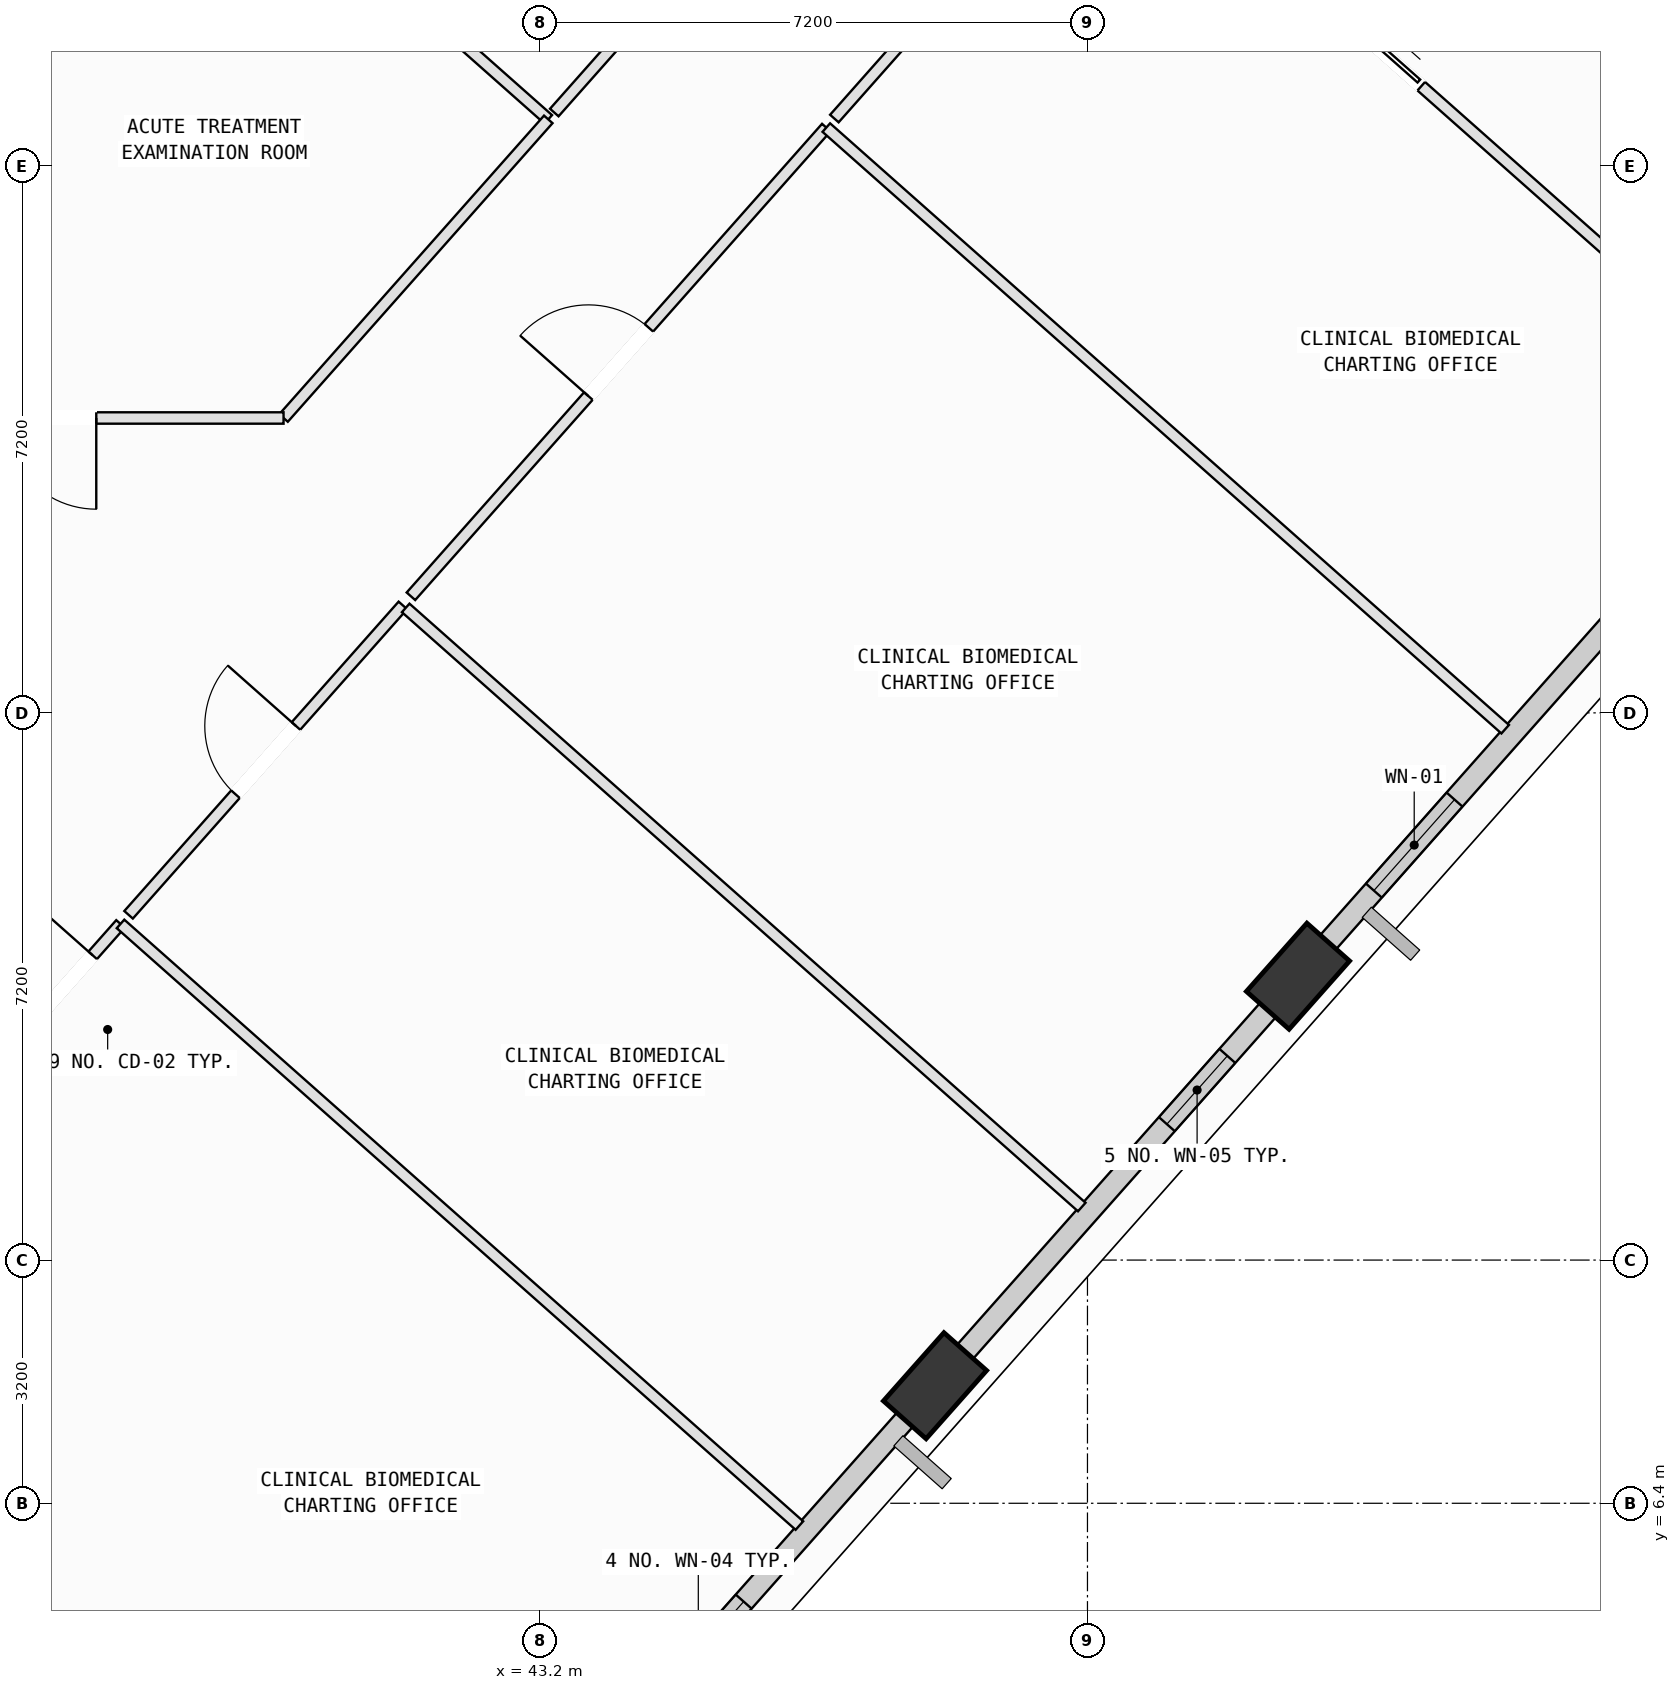
"""IFC4 building model, lengths in metres.
Left out: names, types, materials, properties, quantities, classifications, styles, units other than length and angle.
Written with IfcOpenShell. Run it as: python <this file> out.ifc"""

import sys

from ifc_helpers import new_model, si_unit, direction, frame, frame_2d, origin, origin_2d, place, context, subcontext, project, spatial, rectangle, extrude, element, fill, save


model = new_model("IFC4")
c1 = context("Model", 3, precision=1e-05, world=origin(), true_north=direction((0.0, 1.0)))
c2 = subcontext(c1, "Body", "Model", "MODEL_VIEW")
j1 = project(units=[si_unit("LENGTHUNIT", "METRE"), si_unit("PLANEANGLEUNIT", "RADIAN")], contexts=[c1])
p1 = place(None, origin())
s1 = spatial("IfcSite", under=j1, at=p1, CompositionType="ELEMENT")
p2 = place(p1, origin())
s2 = spatial("IfcBuilding", under=s1, at=p2, CompositionType="ELEMENT")
p3 = place(p2, frame((0.0, 0.0, 231.2)))
s3 = spatial("IfcBuildingStorey", under=s2, at=p3, CompositionType="ELEMENT", Elevation=231.2)
p4 = place(p3, frame((48.394, 7.947, 0.002), z_axis=(0.069040851075, 0.061619719946, 0.995708979068), x_axis=(-0.997598109289, -0.001339471192, 0.069254733848)))
e1 = element("IfcColumn", 1, at=p4, inside=s3, PredefinedType="COLUMN", context=c2, shape_type="SweptSolid", body=[
    extrude(rectangle(XDim=1.2, YDim=0.75, at=origin_2d()), origin(), (0.0, 0.0, 1.0), 4.014),
])
p5 = place(p3, frame((53.17, 13.335, 0.002), z_axis=(0.046651186757, 0.081137787658, 0.995610529368), x_axis=(-0.946393946399, -0.315329163817, 0.070042963004)))
e2 = element("IfcColumn", 2, at=p5, inside=s3, PredefinedType="COLUMN", context=c2, shape_type="SweptSolid", body=[
    extrude(rectangle(XDim=1.2, YDim=0.75, at=origin_2d()), origin(), (0.0, 0.0, 1.0), 4.014),
])
p6 = place(p3, frame((48.253, 7.788, 0.0), z_axis=(0.0, 0.0, 1.0), x_axis=(-0.663285710917, -0.748366264401, 0.0)))
e3 = element("IfcWall", 3, at=p6, inside=s3, PredefinedType="SOLIDWALL", context=c2, shape_type="SweptSolid", body=[
    extrude(rectangle(XDim=6.413, YDim=0.28, at=frame_2d((3.207, 0.0))), origin(), (0.0, 0.0, 1.0), 3.265),
])
p7 = place(p6, frame((3.583, 0.0, 0.75)))
e4 = element("IfcOpeningElement", 4, at=p7, cuts=e3, PredefinedType="OPENING", context=c2, shape_type="SweptSolid", body=[
    extrude(rectangle(XDim=1.8, YDim=2.05, at=frame_2d((0.9, 1.025))), frame((0.0, 0.15, 0.0), z_axis=(0.0, -1.0, 0.0), x_axis=(1.0, 0.0, 0.0)), (0.0, 0.0, 1.0), 0.3),
])
p8 = place(p3, frame((53.03, 13.177, 0.0), z_axis=(0.0, 0.0, 1.0), x_axis=(-0.663279868265, -0.74837144277, 0.0)))
e5 = element("IfcWall", 5, at=p8, inside=s3, PredefinedType="SOLIDWALL", context=c2, shape_type="SweptSolid", body=[
    extrude(rectangle(XDim=6.407, YDim=0.28, at=frame_2d((3.203, 0.0))), origin(), (0.0, 0.0, 1.0), 3.265),
])
p9 = place(p8, frame((1.19, 0.0, 0.75)))
e6 = element("IfcOpeningElement", 6, at=p9, cuts=e5, PredefinedType="OPENING", context=c2, shape_type="SweptSolid", body=[
    extrude(rectangle(XDim=1.2, YDim=1.75, at=frame_2d((0.6, 0.875))), frame((0.0, 0.15, 0.0), z_axis=(0.0, -1.0, 0.0), x_axis=(1.0, 0.0, 0.0)), (0.0, 0.0, 1.0), 0.3),
])
p10 = place(p3, frame((57.812, 18.573, 0.0), z_axis=(0.0, 0.0, 1.0), x_axis=(-0.663260552, -0.748388562287, 0.0)))
e7 = element("IfcWall", 7, at=p10, inside=s3, PredefinedType="SOLIDWALL", context=c2, shape_type="SweptSolid", body=[
    extrude(rectangle(XDim=6.418, YDim=0.28, at=frame_2d((3.209, 0.0))), origin(), (0.0, 0.0, 1.0), 3.265),
])
p11 = place(p10, frame((3.893, 0.0, 0.75)))
e8 = element("IfcOpeningElement", 8, at=p11, cuts=e7, PredefinedType="OPENING", context=c2, shape_type="SweptSolid", body=[
    extrude(rectangle(XDim=1.6, YDim=1.95, at=frame_2d((0.8, 0.975))), frame((0.0, 0.15, 0.0), z_axis=(0.0, -1.0, 0.0), x_axis=(1.0, 0.0, 0.0)), (0.0, 0.0, 1.0), 0.3),
])
p12 = place(p3, frame((53.099, 29.767, 0.0), z_axis=(0.0, 0.0, 1.0), x_axis=(0.748389152316, -0.66325988624, 0.0)))
e9 = element("IfcWall", 9, at=p12, inside=s3, PredefinedType="SOLIDWALL", context=c2, shape_type="SweptSolid", body=[
    extrude(rectangle(XDim=7.046, YDim=0.28, at=frame_2d((3.523, 0.0))), origin(), (0.0, 0.0, 1.0), 3.265),
])
p13 = place(p3, frame((35.147, 24.51, 0.0), z_axis=(0.0, 0.0, 1.0), x_axis=(0.663277940137, 0.748373151661, 0.0)))
e10 = element("IfcWall", 10, at=p13, inside=s3, PredefinedType="SOLIDWALL", context=c2, shape_type="SweptSolid", body=[
    extrude(rectangle(XDim=6.409, YDim=0.28, at=frame_2d((3.205, 0.0))), origin(), (0.0, 0.0, 1.0), 3.265),
])
p14 = place(p13, frame((1.838, 0.0, 0.75)))
e11 = element("IfcOpeningElement", 11, at=p14, cuts=e10, PredefinedType="OPENING", context=c2, shape_type="SweptSolid", body=[
    extrude(rectangle(XDim=1.6, YDim=1.95, at=frame_2d((0.8, 0.975))), frame((0.0, 0.15, 0.0), z_axis=(0.0, -1.0, 0.0), x_axis=(1.0, 0.0, 0.0)), (0.0, 0.0, 1.0), 0.3),
])
p15 = place(p3, frame((32.177, 7.675, 0.0), z_axis=(0.0, 0.0, 1.0), x_axis=(0.748389037184, -0.66326001615, 0.0)))
e12 = element("IfcWall", 12, at=p15, inside=s3, PredefinedType="PARTITIONING", context=c2, shape_type="SweptSolid", body=[
    extrude(rectangle(XDim=11.842, YDim=0.15, at=frame_2d((5.921, 0.0))), origin(), (0.0, 0.0, 1.0), 3.78),
])
p16 = place(p15, frame((5.731, 0.0, 0.0)))
e13 = element("IfcOpeningElement", 13, at=p16, cuts=e12, PredefinedType="OPENING", context=c2, shape_type="SweptSolid", body=[
    extrude(rectangle(XDim=0.86, YDim=2.06, at=frame_2d((0.43, 1.03))), frame((0.0, 0.085, 0.0), z_axis=(0.0, -1.0, 0.0), x_axis=(1.0, 0.0, 0.0)), (0.0, 0.0, 1.0), 0.17),
])
p17 = place(p3, frame((36.15, 12.299, 0.0), z_axis=(0.0, 0.0, 1.0), x_axis=(0.663330445226, 0.748326613476, 0.0)))
e14 = element("IfcWall", 14, at=p17, inside=s3, PredefinedType="PARTITIONING", context=c2, shape_type="SweptSolid", body=[
    extrude(rectangle(XDim=2.304, YDim=0.15, at=frame_2d((1.152, 0.0))), origin(), (0.0, 0.0, 1.0), 3.78),
])
p18 = place(p17, frame((0.552, 0.0, 0.0)))
e15 = element("IfcOpeningElement", 15, at=p18, cuts=e14, PredefinedType="OPENING", context=c2, shape_type="SweptSolid", body=[
    extrude(rectangle(XDim=1.2, YDim=2.15, at=frame_2d((0.6, 1.075))), frame((0.0, 0.085, 0.0), z_axis=(0.0, -1.0, 0.0), x_axis=(1.0, 0.0, 0.0)), (0.0, 0.0, 1.0), 0.17),
])
p19 = place(p3, frame((37.678, 14.023, 0.0), z_axis=(0.0, 0.0, 1.0), x_axis=(0.74839262996, -0.663255962221, 0.0)))
e16 = element("IfcWall", 16, at=p19, inside=s3, PredefinedType="PARTITIONING", context=c2, shape_type="SweptSolid", body=[
    extrude(rectangle(XDim=11.935, YDim=0.15, at=frame_2d((5.968, 0.0))), origin(), (0.0, 0.0, 1.0), 3.78),
])
p20 = place(p3, frame((37.784, 14.143, 0.0), z_axis=(0.0, 0.0, 1.0), x_axis=(0.663380047742, 0.74828264196, 0.0)))
e17 = element("IfcWall", 17, at=p20, inside=s3, PredefinedType="PARTITIONING", context=c2, shape_type="SweptSolid", body=[
    extrude(rectangle(XDim=5.44, YDim=0.15, at=frame_2d((2.72, 0.0))), origin(), (0.0, 0.0, 1.0), 3.78),
])
p21 = place(p20, frame((2.12, 0.0, 0.0)))
e18 = element("IfcOpeningElement", 18, at=p21, cuts=e17, PredefinedType="OPENING", context=c2, shape_type="SweptSolid", body=[
    extrude(rectangle(XDim=1.2, YDim=2.15, at=frame_2d((0.6, 1.075))), frame((0.0, 0.085, 0.0), z_axis=(0.0, -1.0, 0.0), x_axis=(1.0, 0.0, 0.0)), (0.0, 0.0, 1.0), 0.17),
])
p22 = place(p3, frame((41.43, 18.181, 0.0), z_axis=(0.0, 0.0, 1.0), x_axis=(0.748405797498, -0.663241104178, 0.0)))
e19 = element("IfcWall", 19, at=p22, inside=s3, PredefinedType="PARTITIONING", context=c2, shape_type="SweptSolid", body=[
    extrude(rectangle(XDim=11.885, YDim=0.15, at=frame_2d((5.943, 0.0))), origin(), (0.0, 0.0, 1.0), 3.78),
])
p23 = place(p3, frame((48.952, 8.229, 0.0), z_axis=(0.0, 0.0, 1.0), x_axis=(-0.663561863998, -0.748121415712, 0.0)))
e20 = element("IfcWall", 20, at=p23, inside=s3, PredefinedType="PARTITIONING", context=c2, shape_type="SweptSolid", body=[
    extrude(rectangle(XDim=0.794, YDim=0.15, at=frame_2d((0.397, 0.0))), origin(), (0.0, 0.0, 1.0), 3.265),
])
p24 = place(p3, frame((41.499, 18.334, 0.0), z_axis=(0.0, 0.0, 1.0), x_axis=(0.663232090045, 0.748413785773, 0.0)))
e21 = element("IfcWall", 21, at=p24, inside=s3, PredefinedType="PARTITIONING", context=c2, shape_type="SweptSolid", body=[
    extrude(rectangle(XDim=8.24, YDim=0.15, at=frame_2d((4.12, 0.0))), origin(), (0.0, 0.0, 1.0), 3.78),
])
p25 = place(p24, frame((3.52, 0.0, 0.0)))
e22 = element("IfcOpeningElement", 22, at=p25, cuts=e21, PredefinedType="OPENING", context=c2, shape_type="SweptSolid", body=[
    extrude(rectangle(XDim=1.2, YDim=2.15, at=frame_2d((0.6, 1.075))), frame((0.0, 0.085, 0.0), z_axis=(0.0, -1.0, 0.0), x_axis=(1.0, 0.0, 0.0)), (0.0, 0.0, 1.0), 0.17),
])
p26 = place(p3, frame((46.964, 24.501, 0.0), z_axis=(0.0, 0.0, 1.0), x_axis=(0.748383631113, -0.663266116037, 0.0)))
e23 = element("IfcWall", 23, at=p26, inside=s3, PredefinedType="PARTITIONING", context=c2, shape_type="SweptSolid", body=[
    extrude(rectangle(XDim=11.935, YDim=0.15, at=frame_2d((5.967, 0.0))), origin(), (0.0, 0.0, 1.0), 3.78),
])
p27 = place(p3, frame((53.726, 13.617, 0.0), z_axis=(0.0, 0.0, 1.0), x_axis=(-0.662274323809, -0.749261449712, 0.0)))
e24 = element("IfcWall", 24, at=p27, inside=s3, PredefinedType="PARTITIONING", context=c2, shape_type="SweptSolid", body=[
    extrude(rectangle(XDim=0.792, YDim=0.15, at=frame_2d((0.396, 0.0))), origin(), (0.0, 0.0, 1.0), 3.265),
])
p28 = place(p3, frame((47.07, 24.62, 0.0), z_axis=(0.0, 0.0, 1.0), x_axis=(0.663187557716, 0.748453247231, 0.0)))
e25 = element("IfcWall", 25, at=p28, inside=s3, PredefinedType="PARTITIONING", context=c2, shape_type="SweptSolid", body=[
    extrude(rectangle(XDim=5.44, YDim=0.15, at=frame_2d((2.72, 0.0))), origin(), (0.0, 0.0, 1.0), 3.78),
])
p29 = place(p28, frame((2.12, 0.0, 0.0)))
e26 = element("IfcOpeningElement", 26, at=p29, cuts=e25, PredefinedType="OPENING", context=c2, shape_type="SweptSolid", body=[
    extrude(rectangle(XDim=1.2, YDim=2.15, at=frame_2d((0.6, 1.075))), frame((0.0, 0.085, 0.0), z_axis=(0.0, -1.0, 0.0), x_axis=(1.0, 0.0, 0.0)), (0.0, 0.0, 1.0), 0.17),
])
p30 = place(p3, frame((50.678, 28.692, 0.0), z_axis=(0.0, 0.0, 1.0), x_axis=(0.748311065443, -0.663347985099, 0.0)))
e27 = element("IfcWall", 27, at=p30, inside=s3, PredefinedType="PARTITIONING", context=c2, shape_type="SweptSolid", body=[
    extrude(rectangle(XDim=10.135, YDim=0.15, at=frame_2d((5.067, 0.0))), origin(), (0.0, 0.0, 1.0), 3.78),
])
p31 = place(p30, frame((4.637, 0.0, 0.0)))
e28 = element("IfcOpeningElement", 28, at=p31, cuts=e27, PredefinedType="OPENING", context=c2, shape_type="SweptSolid", body=[
    extrude(rectangle(XDim=0.86, YDim=2.06, at=frame_2d((0.43, 1.03))), frame((0.0, 0.085, 0.0), z_axis=(0.0, -1.0, 0.0), x_axis=(1.0, 0.0, 0.0)), (0.0, 0.0, 1.0), 0.17),
])
p32 = place(p3, frame((32.196, 22.009, 0.0), z_axis=(0.0, 0.0, 1.0), x_axis=(0.663258473272, 0.748390404557, 0.0)))
e29 = element("IfcWall", 29, at=p32, inside=s3, PredefinedType="PARTITIONING", context=c2, shape_type="SweptSolid", body=[
    extrude(rectangle(XDim=9.315, YDim=0.15, at=frame_2d((4.657, 0.0))), origin(), (0.0, 0.0, 1.0), 3.78),
])
p33 = place(p3, frame((38.871, 28.539, 0.0), z_axis=(0.0, 0.0, 1.0), x_axis=(0.748404106831, -0.663243011933, 0.0)))
e30 = element("IfcWall", 30, at=p33, inside=s3, PredefinedType="PARTITIONING", context=c2, shape_type="SweptSolid", body=[
    extrude(rectangle(XDim=5.926, YDim=0.15, at=frame_2d((2.963, 0.0))), origin(), (0.0, 0.0, 1.0), 3.78),
])
p34 = place(p3, frame((43.306, 24.609, 0.0), z_axis=(0.0, 0.0, 1.0), x_axis=(-0.663353083876, -0.74830654555, 0.0)))
e31 = element("IfcWall", 31, at=p34, inside=s3, PredefinedType="PARTITIONING", context=c2, shape_type="SweptSolid", body=[
    extrude(rectangle(XDim=5.25, YDim=0.15, at=frame_2d((2.625, 0.0))), origin(), (0.0, 0.0, 1.0), 3.78),
])
p35 = place(p3, frame((39.823, 20.68, 0.0), z_axis=(0.0, 0.0, 1.0), x_axis=(-1.0, 0.0, 0.0)))
e32 = element("IfcWall", 32, at=p35, inside=s3, PredefinedType="PARTITIONING", context=c2, shape_type="SweptSolid", body=[
    extrude(rectangle(XDim=6.128, YDim=0.15, at=frame_2d((3.064, 0.0))), origin(), (0.0, 0.0, 1.0), 3.415),
])
p36 = place(p35, frame((2.464, 0.0, 0.0)))
e33 = element("IfcOpeningElement", 33, at=p36, cuts=e32, PredefinedType="OPENING", context=c2, shape_type="SweptSolid", body=[
    extrude(rectangle(XDim=1.2, YDim=2.15, at=frame_2d((0.6, 1.075))), frame((0.0, 0.085, 0.0), z_axis=(0.0, -1.0, 0.0), x_axis=(1.0, 0.0, 0.0)), (0.0, 0.0, 1.0), 0.17),
])
p37 = place(p3, frame((47.355, 29.178, 0.0), z_axis=(0.0, 0.0, 1.0), x_axis=(-0.663302322505, -0.748351541029, 0.0)))
e34 = element("IfcWall", 34, at=p37, inside=s3, PredefinedType="PARTITIONING", context=c2, shape_type="SweptSolid", body=[
    extrude(rectangle(XDim=5.985, YDim=0.15, at=frame_2d((2.993, 0.0))), origin(), (0.0, 0.0, 1.0), 3.78),
])
p38 = place(p37, frame((2.393, 0.0, 0.0)))
e35 = element("IfcOpeningElement", 35, at=p38, cuts=e34, PredefinedType="OPENING", context=c2, shape_type="SweptSolid", body=[
    extrude(rectangle(XDim=1.2, YDim=2.15, at=frame_2d((0.6, 1.075))), frame((0.0, 0.085, 0.0), z_axis=(0.0, -1.0, 0.0), x_axis=(1.0, 0.0, 0.0)), (0.0, 0.0, 1.0), 0.17),
])
p39 = place(p3, frame((52.589, 30.953, 0.0), z_axis=(0.0, 0.0, 1.0), x_axis=(0.74837940849, -0.663270880522, 0.0)))
e36 = element("IfcWall", 36, at=p39, inside=s3, PredefinedType="PARTITIONING", context=c2, shape_type="SweptSolid", body=[
    extrude(rectangle(XDim=9.67, YDim=0.15, at=frame_2d((4.835, 0.0))), origin(), (0.0, 0.0, 1.0), 3.265),
])
p40 = place(p7, origin())
e37 = element("IfcWindow", 37, at=p40, inside=s3, PartitioningType="SINGLE_PANEL", PredefinedType="WINDOW", context=c2, shape_type="SweptSolid", body=[
    extrude(rectangle(XDim=1.8, YDim=2.05, at=frame_2d((0.9, 1.025))), frame((0.0, 0.03, 0.0), z_axis=(0.0, -1.0, 0.0), x_axis=(1.0, 0.0, 0.0)), (0.0, 0.0, 1.0), 0.06),
])
fill(e4, e37)
p41 = place(p9, origin())
e38 = element("IfcWindow", 38, at=p41, inside=s3, PartitioningType="SINGLE_PANEL", PredefinedType="WINDOW", context=c2, shape_type="SweptSolid", body=[
    extrude(rectangle(XDim=1.2, YDim=1.75, at=frame_2d((0.6, 0.875))), frame((0.0, 0.03, 0.0), z_axis=(0.0, -1.0, 0.0), x_axis=(1.0, 0.0, 0.0)), (0.0, 0.0, 1.0), 0.06),
])
fill(e6, e38)
p42 = place(p11, origin())
e39 = element("IfcWindow", 39, at=p42, inside=s3, PartitioningType="SINGLE_PANEL", PredefinedType="WINDOW", context=c2, shape_type="SweptSolid", body=[
    extrude(rectangle(XDim=1.6, YDim=1.95, at=frame_2d((0.8, 0.975))), frame((0.0, 0.03, 0.0), z_axis=(0.0, -1.0, 0.0), x_axis=(1.0, 0.0, 0.0)), (0.0, 0.0, 1.0), 0.06),
])
fill(e8, e39)
p43 = place(p18, origin())
e40 = element("IfcDoor", 40, at=p43, inside=s3, OperationType="SINGLE_SWING_RIGHT", PredefinedType="DOOR", context=c2, shape_type="SweptSolid", body=[
    extrude(rectangle(XDim=1.2, YDim=2.15, at=frame_2d((0.6, 1.075))), frame((0.0, 0.025, 0.0), z_axis=(0.0, -1.0, 0.0), x_axis=(1.0, 0.0, 0.0)), (0.0, 0.0, 1.0), 0.05),
])
fill(e15, e40)
p44 = place(p21, origin())
e41 = element("IfcDoor", 41, at=p44, inside=s3, OperationType="SINGLE_SWING_RIGHT", PredefinedType="DOOR", context=c2, shape_type="SweptSolid", body=[
    extrude(rectangle(XDim=1.2, YDim=2.15, at=frame_2d((0.6, 1.075))), frame((0.0, 0.025, 0.0), z_axis=(0.0, -1.0, 0.0), x_axis=(1.0, 0.0, 0.0)), (0.0, 0.0, 1.0), 0.05),
])
fill(e18, e41)
p45 = place(p25, origin())
e42 = element("IfcDoor", 42, at=p45, inside=s3, OperationType="SINGLE_SWING_LEFT", PredefinedType="DOOR", context=c2, shape_type="SweptSolid", body=[
    extrude(rectangle(XDim=1.2, YDim=2.15, at=frame_2d((0.6, 1.075))), frame((0.0, 0.025, 0.0), z_axis=(0.0, -1.0, 0.0), x_axis=(1.0, 0.0, 0.0)), (0.0, 0.0, 1.0), 0.05),
])
fill(e22, e42)
p46 = place(p36, origin())
e43 = element("IfcDoor", 43, at=p46, inside=s3, OperationType="SINGLE_SWING_LEFT", PredefinedType="DOOR", context=c2, shape_type="SweptSolid", body=[
    extrude(rectangle(XDim=1.2, YDim=2.15, at=frame_2d((0.6, 1.075))), frame((0.0, 0.025, 0.0), z_axis=(0.0, -1.0, 0.0), x_axis=(1.0, 0.0, 0.0)), (0.0, 0.0, 1.0), 0.05),
])
fill(e33, e43)
p47 = place(p31, origin())
e44 = element("IfcDoor", 44, at=p47, inside=s3, OperationType="SLIDING_TO_LEFT", PredefinedType="DOOR", context=c2, shape_type="SweptSolid", body=[
    extrude(rectangle(XDim=0.86, YDim=2.06, at=frame_2d((0.43, 1.03))), frame((0.0, 0.025, 0.0), z_axis=(0.0, -1.0, 0.0), x_axis=(1.0, 0.0, 0.0)), (0.0, 0.0, 1.0), 0.05),
])
fill(e28, e44)
save(model, sys.argv[1])
